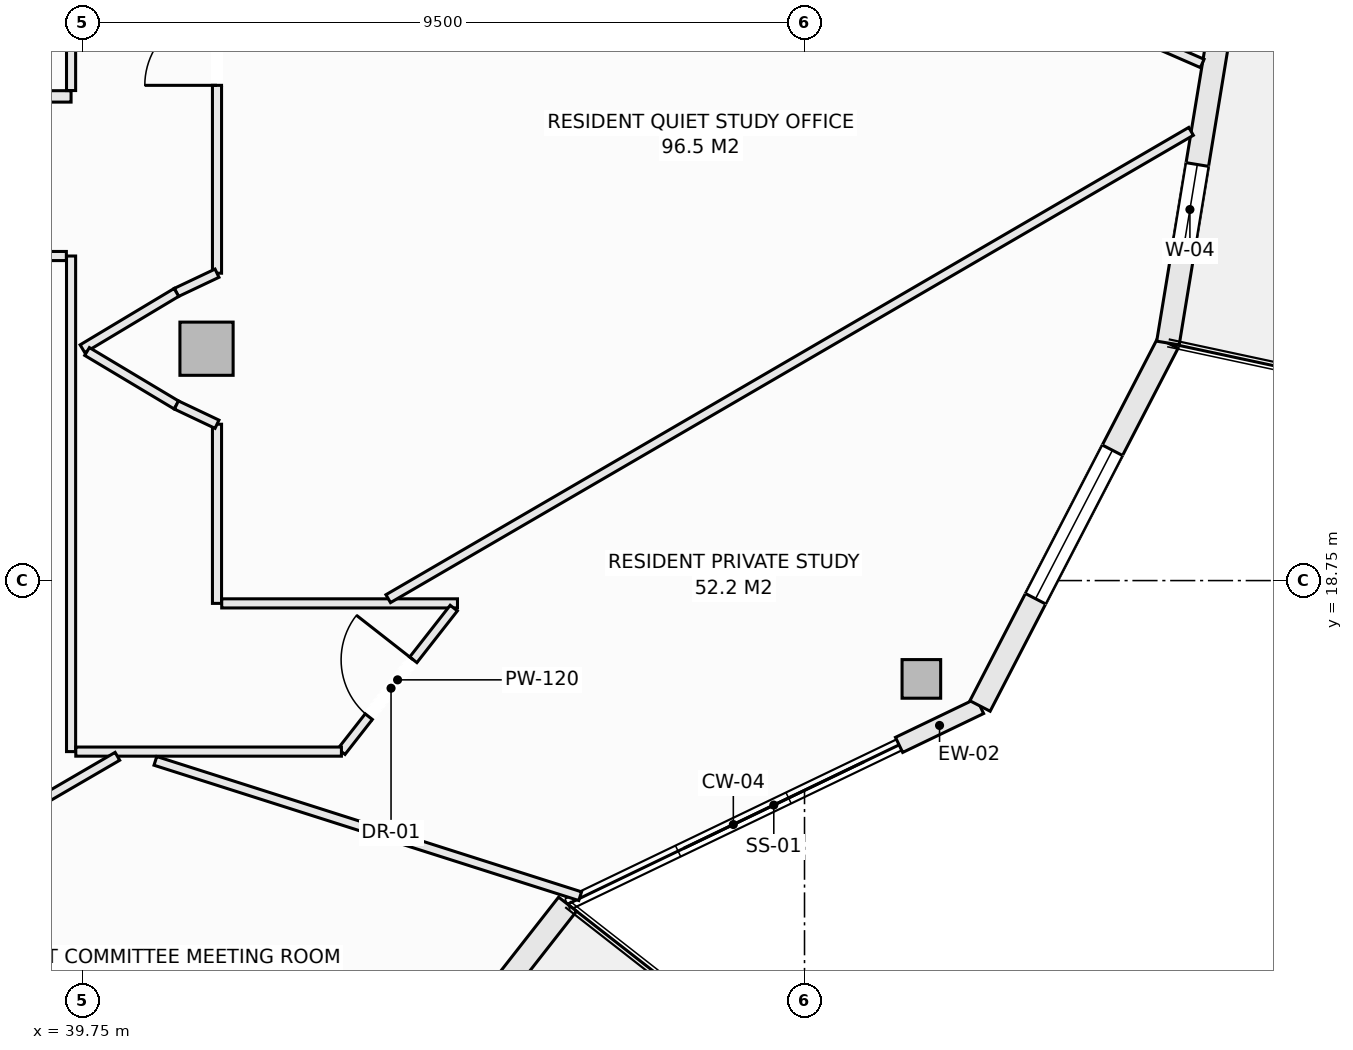
"""IFC4 building model, lengths in metres.
Left out: names, types, materials, properties, quantities, classifications, styles, units other than length and angle.
Written with IfcOpenShell. Run it as: python <this file> out.ifc"""

import sys

from ifc_helpers import new_model, si_unit, direction, frame, frame_2d, origin, origin_2d, place, context, subcontext, project, spatial, rectangle, hollow_rectangle, extrude, element, fill, save


model = new_model("IFC4")
c1 = context("Model", 3, precision=1e-05, world=origin(), true_north=direction((0.0, 1.0)))
c2 = subcontext(c1, "Body", "Model", "MODEL_VIEW")
j1 = project(units=[si_unit("LENGTHUNIT", "METRE"), si_unit("PLANEANGLEUNIT", "RADIAN")], contexts=[c1])
p1 = place(None, origin())
s1 = spatial("IfcSite", under=j1, at=p1, CompositionType="ELEMENT")
p2 = place(p1, origin())
s2 = spatial("IfcBuilding", under=s1, at=p2, CompositionType="ELEMENT")
p3 = place(p2, frame((0.0, 0.0, 232.7)))
s3 = spatial("IfcBuildingStorey", under=s2, at=p3, CompositionType="ELEMENT", Elevation=232.7)
p4 = place(p3, frame((50.787, 17.456, -0.27), z_axis=(0.0, 0.0, 1.0), x_axis=(1.0, 0.0, 0.0)))
e1 = element("IfcColumn", 1, at=p4, inside=s3, PredefinedType="COLUMN", context=c2, shape_type="SweptSolid", body=[
    extrude(hollow_rectangle(XDim=0.508, YDim=0.508, WallThickness=0.019, at=origin_2d()), origin(), (0.0, 0.0, 1.0), 3.3),
])
p5 = place(p3, frame((41.382, 21.801, -0.27), z_axis=(0.0, 0.0, 1.0), x_axis=(1.0, 0.0, 0.0)))
e2 = element("IfcColumn", 2, at=p5, inside=s3, PredefinedType="COLUMN", context=c2, shape_type="SweptSolid", body=[
    extrude(rectangle(XDim=0.7, YDim=0.7, at=origin_2d()), origin(), (0.0, 0.0, 1.0), 3.3),
])
p6 = place(p3, frame((42.5, 9.853, 0.0), z_axis=(0.0, 0.0, 1.0), x_axis=(0.616450126935, 0.787393955401, 0.0)))
e3 = element("IfcWall", 3, at=p6, inside=s3, PredefinedType="SOLIDWALL", context=c2, shape_type="SweptSolid", body=[
    extrude(rectangle(XDim=5.893, YDim=0.3, at=frame_2d((2.946, 0.0))), origin(), (0.0, 0.0, 1.0), 2.605),
])
p7 = place(p6, frame((1.846, 0.0, 0.72)))
e4 = element("IfcOpeningElement", 4, at=p7, cuts=e3, PredefinedType="OPENING", context=c2, shape_type="SweptSolid", body=[
    extrude(rectangle(XDim=2.2, YDim=1.65, at=frame_2d((1.1, 0.825))), frame((0.0, 0.16, 0.0), z_axis=(0.0, -1.0, 0.0), x_axis=(1.0, 0.0, 0.0)), (0.0, 0.0, 1.0), 0.32),
])
p8 = place(p3, frame((50.494, 16.588, 0.0), z_axis=(0.0, 0.0, 1.0), x_axis=(0.901342408365, 0.433107218692, 0.0)))
e5 = element("IfcWall", 5, at=p8, inside=s3, PredefinedType="SOLIDWALL", context=c2, shape_type="SweptSolid", body=[
    extrude(rectangle(XDim=1.181, YDim=0.22, at=frame_2d((0.591, 0.0))), origin(), (0.0, 0.0, 1.0), 2.605),
])
p9 = place(p3, frame((51.559, 17.1, 0.0), z_axis=(0.0, 0.0, 1.0), x_axis=(0.459808219482, 0.888018243786, 0.0)))
e6 = element("IfcWall", 6, at=p9, inside=s3, PredefinedType="SOLIDWALL", context=c2, shape_type="SweptSolid", body=[
    extrude(rectangle(XDim=5.378, YDim=0.3, at=frame_2d((2.689, 0.0))), origin(), (0.0, 0.0, 1.0), 2.605),
])
p10 = place(p9, frame((1.589, 0.0, 0.72)))
e7 = element("IfcOpeningElement", 7, at=p10, cuts=e6, PredefinedType="OPENING", context=c2, shape_type="SweptSolid", body=[
    extrude(rectangle(XDim=2.2, YDim=1.65, at=frame_2d((1.1, 0.825))), frame((0.0, 0.16, 0.0), z_axis=(0.0, -1.0, 0.0), x_axis=(1.0, 0.0, 0.0)), (0.0, 0.0, 1.0), 0.32),
])
p11 = place(p3, frame((54.032, 21.875, 0.0), z_axis=(0.0, 0.0, 1.0), x_axis=(0.16237087798, 0.986729799886, 0.0)))
e8 = element("IfcWall", 8, at=p11, inside=s3, PredefinedType="SOLIDWALL", context=c2, shape_type="SweptSolid", body=[
    extrude(rectangle(XDim=5.193, YDim=0.3, at=frame_2d((2.597, 0.0))), origin(), (0.0, 0.0, 1.0), 2.605),
])
p12 = place(p11, frame((1.18, 0.0, 0.72)))
e9 = element("IfcOpeningElement", 9, at=p12, cuts=e8, PredefinedType="OPENING", context=c2, shape_type="SweptSolid", body=[
    extrude(rectangle(XDim=1.2, YDim=1.65, at=frame_2d((0.6, 0.825))), frame((0.0, 0.16, 0.0), z_axis=(0.0, -1.0, 0.0), x_axis=(1.0, 0.0, 0.0)), (0.0, 0.0, 1.0), 0.32),
])
p13 = place(p3, frame((33.377, 25.12, 0.0), z_axis=(0.0, 0.0, 1.0), x_axis=(1.0, 0.0, 0.0)))
e10 = element("IfcWall", 10, at=p13, inside=s3, PredefinedType="PARTITIONING", context=c2, shape_type="SweptSolid", body=[
    extrude(rectangle(XDim=6.223, YDim=0.15, at=frame_2d((3.112, 0.0))), origin(), (0.0, 0.0, 1.0), 3.03),
])
p14 = place(p13, frame((2.441, 0.0, 0.0)))
e11 = element("IfcOpeningElement", 11, at=p14, cuts=e10, PredefinedType="OPENING", context=c2, shape_type="SweptSolid", body=[
    extrude(rectangle(XDim=0.95, YDim=2.1, at=frame_2d((0.475, 1.05))), frame((0.0, 0.085, 0.0), z_axis=(0.0, -1.0, 0.0), x_axis=(1.0, 0.0, 0.0)), (0.0, 0.0, 1.0), 0.17),
])
p15 = place(p3, frame((39.6, 16.5, 0.0), z_axis=(0.0, 0.0, 1.0), x_axis=(0.0, 1.0, 0.0)))
e12 = element("IfcWall", 12, at=p15, inside=s3, PredefinedType="PARTITIONING", context=c2, shape_type="SweptSolid", body=[
    extrude(rectangle(XDim=6.52, YDim=0.12, at=frame_2d((3.26, 0.0))), origin(), (0.0, 0.0, 1.0), 2.478),
])
p16 = place(p3, frame((39.6, 25.197, 0.0), z_axis=(0.0, 0.0, 1.0), x_axis=(0.0, 1.0, 0.0)))
e13 = element("IfcWall", 13, at=p16, inside=s3, PredefinedType="PARTITIONING", context=c2, shape_type="SweptSolid", body=[
    extrude(rectangle(XDim=3.646, YDim=0.12, at=frame_2d((1.823, 0.0))), origin(), (0.0, 0.0, 1.0), 3.03),
])
p17 = place(p3, frame((41.52, 18.45, 0.0), z_axis=(0.0, 0.0, 1.0), x_axis=(0.0, 1.0, 0.0)))
e14 = element("IfcWall", 14, at=p17, inside=s3, PredefinedType="PARTITIONING", context=c2, shape_type="SweptSolid", body=[
    extrude(rectangle(XDim=2.357, YDim=0.12, at=frame_2d((1.178, 0.0))), origin(), (0.0, 0.0, 1.0), 3.03),
])
p18 = place(p3, frame((41.52, 22.794, 0.0), z_axis=(0.0, 0.0, 1.0), x_axis=(0.0, 1.0, 0.0)))
e15 = element("IfcWall", 15, at=p18, inside=s3, PredefinedType="PARTITIONING", context=c2, shape_type="SweptSolid", body=[
    extrude(rectangle(XDim=8.413, YDim=0.12, at=frame_2d((4.207, 0.0))), origin(), (0.0, 0.0, 1.0), 2.478),
])
p19 = place(p18, frame((2.471, 0.0, 0.0)))
e16 = element("IfcOpeningElement", 16, at=p19, cuts=e15, PredefinedType="OPENING", context=c2, shape_type="SweptSolid", body=[
    extrude(rectangle(XDim=0.95, YDim=2.1, at=frame_2d((0.475, 1.05))), frame((0.0, 0.07, 0.0), z_axis=(0.0, -1.0, 0.0), x_axis=(1.0, 0.0, 0.0)), (0.0, 0.0, 1.0), 0.14),
])
p20 = place(p3, frame((40.986, 22.541, 0.0), z_axis=(0.0, 0.0, 1.0), x_axis=(0.903729424576, 0.428104107847, 0.0)))
e17 = element("IfcWall", 17, at=p20, inside=s3, PredefinedType="PARTITIONING", context=c2, shape_type="SweptSolid", body=[
    extrude(rectangle(XDim=0.591, YDim=0.12, at=frame_2d((0.295, 0.0))), origin(), (0.0, 0.0, 1.0), 3.03),
])
p21 = place(p3, frame((39.75, 21.8, 0.0), z_axis=(0.0, 0.0, 1.0), x_axis=(0.857702120906, 0.514146935996, 0.0)))
e18 = element("IfcWall", 18, at=p21, inside=s3, PredefinedType="PARTITIONING", context=c2, shape_type="SweptSolid", body=[
    extrude(rectangle(XDim=1.441, YDim=0.12, at=frame_2d((0.721, 0.0))), origin(), (0.0, 0.0, 1.0), 3.03),
])
p22 = place(p3, frame((39.81, 21.764, 0.0), z_axis=(0.0, 0.0, 1.0), x_axis=(0.858011245414, -0.513630901273, 0.0)))
e19 = element("IfcWall", 19, at=p22, inside=s3, PredefinedType="PARTITIONING", context=c2, shape_type="SweptSolid", body=[
    extrude(rectangle(XDim=1.37, YDim=0.12, at=frame_2d((0.685, 0.0))), origin(), (0.0, 0.0, 1.0), 3.03),
])
p23 = place(p3, frame((40.986, 21.06, 0.0), z_axis=(0.0, 0.0, 1.0), x_axis=(0.90356951601, -0.428441512621, 0.0)))
e20 = element("IfcWall", 20, at=p23, inside=s3, PredefinedType="PARTITIONING", context=c2, shape_type="SweptSolid", body=[
    extrude(rectangle(XDim=0.591, YDim=0.12, at=frame_2d((0.295, 0.0))), origin(), (0.0, 0.0, 1.0), 3.03),
])
p24 = place(p3, frame((41.582, 18.45, 0.0), z_axis=(0.0, 0.0, 1.0), x_axis=(1.0, 0.0, 0.0)))
e21 = element("IfcWall", 21, at=p24, inside=s3, PredefinedType="PARTITIONING", context=c2, shape_type="SweptSolid", body=[
    extrude(rectangle(XDim=3.102, YDim=0.12, at=frame_2d((1.551, 0.0))), origin(), (0.0, 0.0, 1.0), 3.03),
])
p25 = place(p3, frame((43.157, 16.5, 0.0), z_axis=(0.0, 0.0, 1.0), x_axis=(0.616566276607, 0.787303008092, 0.0)))
e22 = element("IfcWall", 22, at=p25, inside=s3, PredefinedType="PARTITIONING", context=c2, shape_type="SweptSolid", body=[
    extrude(rectangle(XDim=2.398, YDim=0.12, at=frame_2d((1.199, 0.0))), origin(), (0.0, 0.0, 1.0), 3.03),
])
p26 = place(p25, frame((0.584, 0.0, 0.0)))
e23 = element("IfcOpeningElement", 23, at=p26, cuts=e22, PredefinedType="OPENING", context=c2, shape_type="SweptSolid", body=[
    extrude(rectangle(XDim=0.95, YDim=2.1, at=frame_2d((0.475, 1.05))), frame((0.0, 0.07, 0.0), z_axis=(0.0, -1.0, 0.0), x_axis=(1.0, 0.0, 0.0)), (0.0, 0.0, 1.0), 0.14),
])
p27 = place(p3, frame((39.662, 16.5, 0.0), z_axis=(0.0, 0.0, 1.0), x_axis=(1.0, 0.0, 0.0)))
e24 = element("IfcWall", 24, at=p27, inside=s3, PredefinedType="PARTITIONING", context=c2, shape_type="SweptSolid", body=[
    extrude(rectangle(XDim=3.495, YDim=0.12, at=frame_2d((1.748, 0.0))), origin(), (0.0, 0.0, 1.0), 2.77),
])
p28 = place(p3, frame((39.0, 23.02, 0.0), z_axis=(0.0, 0.0, 1.0), x_axis=(1.0, 0.0, 0.0)))
e25 = element("IfcWall", 25, at=p28, inside=s3, PredefinedType="PARTITIONING", context=c2, shape_type="SweptSolid", body=[
    extrude(rectangle(XDim=0.538, YDim=0.12, at=frame_2d((0.269, 0.0))), origin(), (0.0, 0.0, 1.0), 3.03),
])
p29 = place(p3, frame((36.012, 13.995, 0.0), z_axis=(0.0, 0.0, 1.0), x_axis=(0.864278013608, 0.503014428415, 0.0)))
e26 = element("IfcWall", 26, at=p29, inside=s3, PredefinedType="PARTITIONING", context=c2, shape_type="SweptSolid", body=[
    extrude(rectangle(XDim=4.857, YDim=0.12, at=frame_2d((2.428, 0.0))), origin(), (0.0, 0.0, 1.0), 2.478),
])
p30 = place(p3, frame((43.773, 18.512, 0.0), z_axis=(0.0, 0.0, 1.0), x_axis=(0.864261022419, 0.503043621495, 0.0)))
e27 = element("IfcWall", 27, at=p30, inside=s3, PredefinedType="PARTITIONING", context=c2, shape_type="SweptSolid", body=[
    extrude(rectangle(XDim=12.222, YDim=0.12, at=frame_2d((6.111, 0.0))), origin(), (0.0, 0.0, 1.0), 3.03),
])
p31 = place(p3, frame((40.709, 16.378, 0.0), z_axis=(0.0, 0.0, 1.0), x_axis=(0.952839371161, -0.303475094144, 0.0)))
e28 = element("IfcWall", 28, at=p31, inside=s3, PredefinedType="PARTITIONING", context=c2, shape_type="SweptSolid", body=[
    extrude(rectangle(XDim=5.865, YDim=0.12, at=frame_2d((2.933, 0.0))), origin(), (0.0, 0.0, 1.0), 2.77),
])
p32 = place(p3, frame((41.582, 31.18, 0.0), z_axis=(0.0, 0.0, 1.0), x_axis=(0.916624100851, -0.399750244202, 0.0)))
e29 = element("IfcWall", 29, at=p32, inside=s3, PredefinedType="PARTITIONING", context=c2, shape_type="SweptSolid", body=[
    extrude(rectangle(XDim=14.074, YDim=0.12, at=frame_2d((7.037, 0.0))), origin(), (0.0, 0.0, 1.0), 2.478),
])
p33 = place(p10, origin())
e30 = element("IfcWindow", 30, at=p33, inside=s3, PartitioningType="SINGLE_PANEL", PredefinedType="WINDOW", context=c2, shape_type="SweptSolid", body=[
    extrude(rectangle(XDim=2.2, YDim=1.65, at=frame_2d((1.1, 0.825))), frame((0.0, 0.03, 0.0), z_axis=(0.0, -1.0, 0.0), x_axis=(1.0, 0.0, 0.0)), (0.0, 0.0, 1.0), 0.06),
])
fill(e7, e30)
p34 = place(p12, origin())
e31 = element("IfcWindow", 31, at=p34, inside=s3, PartitioningType="SINGLE_PANEL", PredefinedType="WINDOW", context=c2, shape_type="SweptSolid", body=[
    extrude(rectangle(XDim=1.2, YDim=1.65, at=frame_2d((0.6, 0.825))), frame((0.0, 0.03, 0.0), z_axis=(0.0, -1.0, 0.0), x_axis=(1.0, 0.0, 0.0)), (0.0, 0.0, 1.0), 0.06),
])
fill(e9, e31)
p35 = place(p26, origin())
e32 = element("IfcDoor", 32, at=p35, inside=s3, OperationType="SINGLE_SWING_RIGHT", PredefinedType="DOOR", context=c2, shape_type="SweptSolid", body=[
    extrude(rectangle(XDim=0.95, YDim=2.1, at=frame_2d((0.475, 1.05))), frame((0.0, 0.025, 0.0), z_axis=(0.0, -1.0, 0.0), x_axis=(1.0, 0.0, 0.0)), (0.0, 0.0, 1.0), 0.05),
])
fill(e23, e32)
p36 = place(p19, origin())
e33 = element("IfcDoor", 33, at=p36, inside=s3, OperationType="SINGLE_SWING_LEFT", PredefinedType="DOOR", context=c2, shape_type="SweptSolid", body=[
    extrude(rectangle(XDim=0.95, YDim=2.1, at=frame_2d((0.475, 1.05))), frame((0.0, 0.025, 0.0), z_axis=(0.0, -1.0, 0.0), x_axis=(1.0, 0.0, 0.0)), (0.0, 0.0, 1.0), 0.05),
])
fill(e16, e33)
save(model, sys.argv[1])
